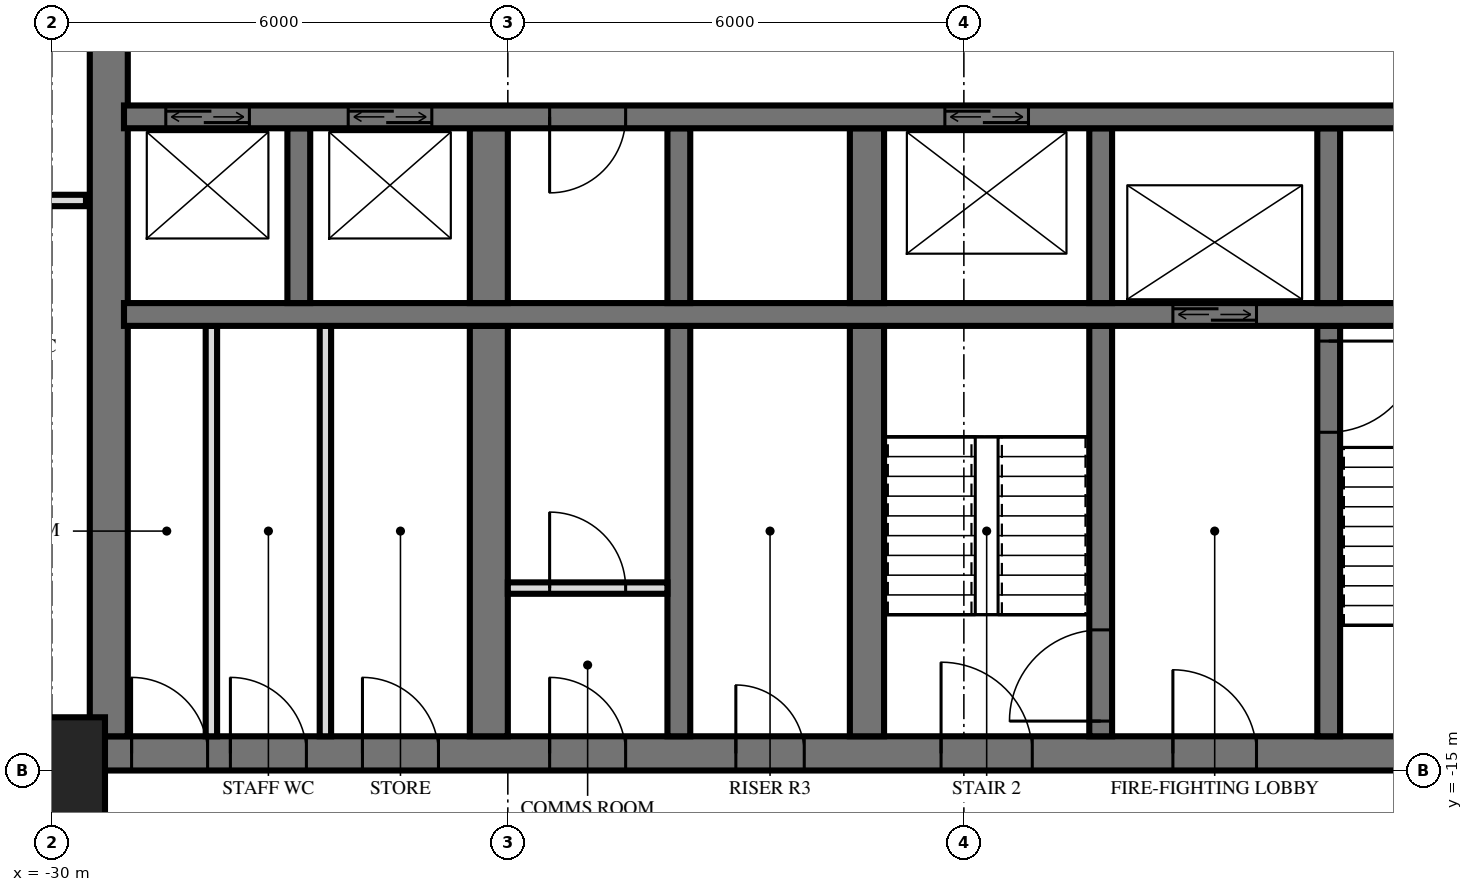
"""IFC4 building model, lengths in metres.
Left out: names, types, materials, properties, quantities, classifications, styles, units other than length and angle.
Written with IfcOpenShell. Run it as: python <this file> out.ifc"""

import sys

from ifc_helpers import new_model, si_unit, direction, frame, frame_2d, origin, origin_2d, place, context, subcontext, project, spatial, rectangle, extrude, element, fill, save


model = new_model("IFC4")
c1 = context("Model", 3, precision=1e-05, world=origin(), true_north=direction((0.0, 1.0)))
c2 = subcontext(c1, "Body", "Model", "MODEL_VIEW")
j1 = project(units=[si_unit("LENGTHUNIT", "METRE"), si_unit("PLANEANGLEUNIT", "RADIAN")], contexts=[c1])
p1 = place(None, origin())
s1 = spatial("IfcSite", under=j1, at=p1, CompositionType="ELEMENT")
p2 = place(p1, origin())
s2 = spatial("IfcBuilding", under=s1, at=p2, CompositionType="ELEMENT")
p3 = place(p2, frame((0.0, 0.0, 92.4)))
s3 = spatial("IfcBuildingStorey", under=s2, at=p3, CompositionType="ELEMENT", Elevation=92.4)
p4 = place(p3, frame((-30.0, -15.0, 0.0), z_axis=(0.0, 0.0, 1.0), x_axis=(1.0, 0.0, 0.0)))
e1 = element("IfcColumn", 1, at=p4, inside=s3, PredefinedType="COLUMN", context=c2, shape_type="SweptSolid", body=[
    extrude(rectangle(XDim=1.4, YDim=1.4, at=origin_2d()), origin(), (0.0, 0.0, 1.0), 3.6),
])
p5 = place(p3, frame((-29.5, -14.775, 0.0), z_axis=(0.0, 0.0, 1.0), x_axis=(1.0, 0.0, 0.0)))
e2 = element("IfcWall", 2, at=p5, inside=s3, PredefinedType="SHEAR", context=c2, shape_type="SweptSolid", body=[
    extrude(rectangle(XDim=19.5, YDim=0.45, at=frame_2d((9.75, 0.0))), origin(), (0.0, 0.0, 1.0), 3.6),
])
p6 = place(p5, frame((11.2, 0.0, 0.0)))
e3 = element("IfcOpeningElement", 3, at=p6, cuts=e2, PredefinedType="OPENING", context=c2, shape_type="SweptSolid", body=[
    extrude(rectangle(XDim=1.2, YDim=2.1, at=frame_2d((0.6, 1.05))), frame((0.0, 0.235, 0.0), z_axis=(0.0, -1.0, 0.0), x_axis=(1.0, 0.0, 0.0)), (0.0, 0.0, 1.0), 0.47),
])
p7 = place(p5, frame((14.25, 0.0, 0.0)))
e4 = element("IfcOpeningElement", 4, at=p7, cuts=e2, PredefinedType="OPENING", context=c2, shape_type="SweptSolid", body=[
    extrude(rectangle(XDim=1.1, YDim=2.1, at=frame_2d((0.55, 1.05))), frame((0.0, 0.235, 0.0), z_axis=(0.0, -1.0, 0.0), x_axis=(1.0, 0.0, 0.0)), (0.0, 0.0, 1.0), 0.47),
])
p8 = place(p5, frame((8.5, 0.0, 0.0)))
e5 = element("IfcOpeningElement", 5, at=p8, cuts=e2, PredefinedType="OPENING", context=c2, shape_type="SweptSolid", body=[
    extrude(rectangle(XDim=0.9, YDim=2.1, at=frame_2d((0.45, 1.05))), frame((0.0, 0.235, 0.0), z_axis=(0.0, -1.0, 0.0), x_axis=(1.0, 0.0, 0.0)), (0.0, 0.0, 1.0), 0.47),
])
p9 = place(p5, frame((6.05, 0.0, 0.0)))
e6 = element("IfcOpeningElement", 6, at=p9, cuts=e2, PredefinedType="OPENING", context=c2, shape_type="SweptSolid", body=[
    extrude(rectangle(XDim=1.0, YDim=2.1, at=frame_2d((0.5, 1.05))), frame((0.0, 0.235, 0.0), z_axis=(0.0, -1.0, 0.0), x_axis=(1.0, 0.0, 0.0)), (0.0, 0.0, 1.0), 0.47),
])
p10 = place(p5, frame((3.587, 0.0, 0.0)))
e7 = element("IfcOpeningElement", 7, at=p10, cuts=e2, PredefinedType="OPENING", context=c2, shape_type="SweptSolid", body=[
    extrude(rectangle(XDim=1.0, YDim=2.1, at=frame_2d((0.5, 1.05))), frame((0.0, 0.235, 0.0), z_axis=(0.0, -1.0, 0.0), x_axis=(1.0, 0.0, 0.0)), (0.0, 0.0, 1.0), 0.47),
])
p11 = place(p5, frame((1.85, 0.0, 0.0)))
e8 = element("IfcOpeningElement", 8, at=p11, cuts=e2, PredefinedType="OPENING", context=c2, shape_type="SweptSolid", body=[
    extrude(rectangle(XDim=1.0, YDim=2.1, at=frame_2d((0.5, 1.05))), frame((0.0, 0.235, 0.0), z_axis=(0.0, -1.0, 0.0), x_axis=(1.0, 0.0, 0.0)), (0.0, 0.0, 1.0), 0.47),
])
p12 = place(p5, frame((0.55, 0.0, 0.0)))
e9 = element("IfcOpeningElement", 9, at=p12, cuts=e2, PredefinedType="OPENING", context=c2, shape_type="SweptSolid", body=[
    extrude(rectangle(XDim=1.0, YDim=2.1, at=frame_2d((0.5, 1.05))), frame((0.0, 0.235, 0.0), z_axis=(0.0, -1.0, 0.0), x_axis=(1.0, 0.0, 0.0)), (0.0, 0.0, 1.0), 0.47),
])
p13 = place(p3, frame((-29.25, -14.55, 0.0), z_axis=(0.0, 0.0, 1.0), x_axis=(0.0, 1.0, 0.0)))
e10 = element("IfcWall", 10, at=p13, inside=s3, PredefinedType="SHEAR", context=c2, shape_type="SweptSolid", body=[
    extrude(rectangle(XDim=14.1, YDim=0.5, at=frame_2d((7.05, 0.0))), origin(), (0.0, 0.0, 1.0), 3.6),
])
p14 = place(p3, frame((-29.05, -6.4, 0.0), z_axis=(0.0, 0.0, 1.0), x_axis=(1.0, 0.0, 0.0)))
e11 = element("IfcWall", 11, at=p14, inside=s3, PredefinedType="SHEAR", context=c2, shape_type="SweptSolid", body=[
    extrude(rectangle(XDim=18.7, YDim=0.3, at=frame_2d((9.35, 0.0))), origin(), (0.0, 0.0, 1.0), 3.6),
])
p15 = place(p14, frame((2.95, 0.0, 0.0)))
e12 = element("IfcOpeningElement", 12, at=p15, cuts=e11, PredefinedType="OPENING", context=c2, shape_type="SweptSolid", body=[
    extrude(rectangle(XDim=1.1, YDim=2.1, at=frame_2d((0.55, 1.05))), frame((0.0, 0.16, 0.0), z_axis=(0.0, -1.0, 0.0), x_axis=(1.0, 0.0, 0.0)), (0.0, 0.0, 1.0), 0.32),
])
p16 = place(p14, frame((0.55, 0.0, 0.0)))
e13 = element("IfcOpeningElement", 13, at=p16, cuts=e11, PredefinedType="OPENING", context=c2, shape_type="SweptSolid", body=[
    extrude(rectangle(XDim=1.1, YDim=2.1, at=frame_2d((0.55, 1.05))), frame((0.0, 0.16, 0.0), z_axis=(0.0, -1.0, 0.0), x_axis=(1.0, 0.0, 0.0)), (0.0, 0.0, 1.0), 0.32),
])
p17 = place(p14, frame((10.8, 0.0, 0.0)))
e14 = element("IfcOpeningElement", 14, at=p17, cuts=e11, PredefinedType="OPENING", context=c2, shape_type="SweptSolid", body=[
    extrude(rectangle(XDim=1.1, YDim=2.1, at=frame_2d((0.55, 1.05))), frame((0.0, 0.16, 0.0), z_axis=(0.0, -1.0, 0.0), x_axis=(1.0, 0.0, 0.0)), (0.0, 0.0, 1.0), 0.32),
])
p18 = place(p14, frame((5.6, 0.0, 0.0)))
e15 = element("IfcOpeningElement", 15, at=p18, cuts=e11, PredefinedType="OPENING", context=c2, shape_type="SweptSolid", body=[
    extrude(rectangle(XDim=1.0, YDim=2.1, at=frame_2d((0.5, 1.05))), frame((0.0, 0.16, 0.0), z_axis=(0.0, -1.0, 0.0), x_axis=(1.0, 0.0, 0.0)), (0.0, 0.0, 1.0), 0.32),
])
p19 = place(p3, frame((-29.05, -9.0, 0.0), z_axis=(0.0, 0.0, 1.0), x_axis=(1.0, 0.0, 0.0)))
e16 = element("IfcWall", 16, at=p19, inside=s3, PredefinedType="SHEAR", context=c2, shape_type="SweptSolid", body=[
    extrude(rectangle(XDim=18.7, YDim=0.3, at=frame_2d((9.35, 0.0))), origin(), (0.0, 0.0, 1.0), 3.6),
])
p20 = place(p19, frame((13.8, 0.0, 0.0)))
e17 = element("IfcOpeningElement", 17, at=p20, cuts=e16, PredefinedType="OPENING", context=c2, shape_type="SweptSolid", body=[
    extrude(rectangle(XDim=1.1, YDim=2.1, at=frame_2d((0.55, 1.05))), frame((0.0, 0.16, 0.0), z_axis=(0.0, -1.0, 0.0), x_axis=(1.0, 0.0, 0.0)), (0.0, 0.0, 1.0), 0.32),
])
p21 = place(p3, frame((-13.2, -8.85, 0.0), z_axis=(0.0, 0.0, 1.0), x_axis=(0.0, 1.0, 0.0)))
e18 = element("IfcWall", 18, at=p21, inside=s3, PredefinedType="SHEAR", context=c2, shape_type="SweptSolid", body=[
    extrude(rectangle(XDim=2.3, YDim=0.3, at=frame_2d((1.15, 0.0))), origin(), (0.0, 0.0, 1.0), 3.6),
])
p22 = place(p3, frame((-13.2, -14.55, 0.0), z_axis=(0.0, 0.0, 1.0), x_axis=(0.0, 1.0, 0.0)))
e19 = element("IfcWall", 19, at=p22, inside=s3, PredefinedType="SHEAR", context=c2, shape_type="SweptSolid", body=[
    extrude(rectangle(XDim=5.4, YDim=0.3, at=frame_2d((2.7, 0.0))), origin(), (0.0, 0.0, 1.0), 3.6),
])
p23 = place(p22, frame((4.0, 0.0, 0.0)))
e20 = element("IfcOpeningElement", 20, at=p23, cuts=e19, PredefinedType="OPENING", context=c2, shape_type="SweptSolid", body=[
    extrude(rectangle(XDim=1.2, YDim=2.1, at=frame_2d((0.6, 1.05))), frame((0.0, 0.16, 0.0), z_axis=(0.0, -1.0, 0.0), x_axis=(1.0, 0.0, 0.0)), (0.0, 0.0, 1.0), 0.32),
])
p24 = place(p3, frame((-16.2, -8.85, 0.0), z_axis=(0.0, 0.0, 1.0), x_axis=(0.0, 1.0, 0.0)))
e21 = element("IfcWall", 21, at=p24, inside=s3, PredefinedType="SHEAR", context=c2, shape_type="SweptSolid", body=[
    extrude(rectangle(XDim=2.3, YDim=0.3, at=frame_2d((1.15, 0.0))), origin(), (0.0, 0.0, 1.0), 3.6),
])
p25 = place(p3, frame((-16.2, -14.55, 0.0), z_axis=(0.0, 0.0, 1.0), x_axis=(0.0, 1.0, 0.0)))
e22 = element("IfcWall", 22, at=p25, inside=s3, PredefinedType="SHEAR", context=c2, shape_type="SweptSolid", body=[
    extrude(rectangle(XDim=5.4, YDim=0.3, at=frame_2d((2.7, 0.0))), origin(), (0.0, 0.0, 1.0), 3.6),
])
p26 = place(p25, frame((0.2, 0.0, 0.0)))
e23 = element("IfcOpeningElement", 23, at=p26, cuts=e22, PredefinedType="OPENING", context=c2, shape_type="SweptSolid", body=[
    extrude(rectangle(XDim=1.2, YDim=2.1, at=frame_2d((0.6, 1.05))), frame((0.0, 0.16, 0.0), z_axis=(0.0, -1.0, 0.0), x_axis=(1.0, 0.0, 0.0)), (0.0, 0.0, 1.0), 0.32),
])
p27 = place(p3, frame((-19.275, -8.85, 0.0), z_axis=(0.0, 0.0, 1.0), x_axis=(0.0, 1.0, 0.0)))
e24 = element("IfcWall", 24, at=p27, inside=s3, PredefinedType="SHEAR", context=c2, shape_type="SweptSolid", body=[
    extrude(rectangle(XDim=2.3, YDim=0.45, at=frame_2d((1.15, 0.0))), origin(), (0.0, 0.0, 1.0), 3.6),
])
p28 = place(p3, frame((-19.275, -14.55, 0.0), z_axis=(0.0, 0.0, 1.0), x_axis=(0.0, 1.0, 0.0)))
e25 = element("IfcWall", 25, at=p28, inside=s3, PredefinedType="SHEAR", context=c2, shape_type="SweptSolid", body=[
    extrude(rectangle(XDim=5.4, YDim=0.45, at=frame_2d((2.7, 0.0))), origin(), (0.0, 0.0, 1.0), 3.6),
])
p29 = place(p3, frame((-21.75, -8.85, 0.0), z_axis=(0.0, 0.0, 1.0), x_axis=(0.0, 1.0, 0.0)))
e26 = element("IfcWall", 26, at=p29, inside=s3, PredefinedType="SHEAR", context=c2, shape_type="SweptSolid", body=[
    extrude(rectangle(XDim=2.3, YDim=0.3, at=frame_2d((1.15, 0.0))), origin(), (0.0, 0.0, 1.0), 3.6),
])
p30 = place(p3, frame((-21.75, -14.55, 0.0), z_axis=(0.0, 0.0, 1.0), x_axis=(0.0, 1.0, 0.0)))
e27 = element("IfcWall", 27, at=p30, inside=s3, PredefinedType="SHEAR", context=c2, shape_type="SweptSolid", body=[
    extrude(rectangle(XDim=5.4, YDim=0.3, at=frame_2d((2.7, 0.0))), origin(), (0.0, 0.0, 1.0), 3.6),
])
p31 = place(p3, frame((-24.25, -8.85, 0.0), z_axis=(0.0, 0.0, 1.0), x_axis=(0.0, 1.0, 0.0)))
e28 = element("IfcWall", 28, at=p31, inside=s3, PredefinedType="SHEAR", context=c2, shape_type="SweptSolid", body=[
    extrude(rectangle(XDim=2.3, YDim=0.5, at=frame_2d((1.15, 0.0))), origin(), (0.0, 0.0, 1.0), 3.6),
])
p32 = place(p3, frame((-24.25, -14.55, 0.0), z_axis=(0.0, 0.0, 1.0), x_axis=(0.0, 1.0, 0.0)))
e29 = element("IfcWall", 29, at=p32, inside=s3, PredefinedType="SHEAR", context=c2, shape_type="SweptSolid", body=[
    extrude(rectangle(XDim=5.4, YDim=0.5, at=frame_2d((2.7, 0.0))), origin(), (0.0, 0.0, 1.0), 3.6),
])
p33 = place(p3, frame((-26.75, -8.85, 0.0), z_axis=(0.0, 0.0, 1.0), x_axis=(0.0, 1.0, 0.0)))
e30 = element("IfcWall", 30, at=p33, inside=s3, PredefinedType="SHEAR", context=c2, shape_type="SweptSolid", body=[
    extrude(rectangle(XDim=2.3, YDim=0.3, at=frame_2d((1.15, 0.0))), origin(), (0.0, 0.0, 1.0), 3.6),
])
p34 = place(p3, frame((-24.0, -12.6, 0.0), z_axis=(0.0, 0.0, 1.0), x_axis=(1.0, 0.0, 0.0)))
e31 = element("IfcWall", 31, at=p34, inside=s3, PredefinedType="PARTITIONING", context=c2, shape_type="SweptSolid", body=[
    extrude(rectangle(XDim=2.1, YDim=0.15, at=frame_2d((1.05, 0.0))), origin(), (0.0, 0.0, 1.0), 3.3),
])
p35 = place(p34, frame((0.55, 0.0, 0.0)))
e32 = element("IfcOpeningElement", 32, at=p35, cuts=e31, PredefinedType="OPENING", context=c2, shape_type="SweptSolid", body=[
    extrude(rectangle(XDim=1.0, YDim=2.1, at=frame_2d((0.5, 1.05))), frame((0.0, 0.085, 0.0), z_axis=(0.0, -1.0, 0.0), x_axis=(1.0, 0.0, 0.0)), (0.0, 0.0, 1.0), 0.17),
])
for number, where, z_axis, x_axis in (
    (33, (-26.4, -14.55, 0.0), (0.0, 0.0, 1.0), (0.0, 1.0, 0.0)),
    (34, (-27.9, -14.55, 0.0), (0.0, 0.0, 1.0), (0.0, 1.0, 0.0)),
):
    element("IfcWall", number, at=place(p3, frame(where, z_axis=z_axis, x_axis=x_axis)), inside=s3, PredefinedType="PARTITIONING", context=c2, shape_type="SweptSolid", body=[
        extrude(rectangle(XDim=5.4, YDim=0.15, at=frame_2d((2.7, 0.0))), origin(), (0.0, 0.0, 1.0), 3.3),
    ])
p36 = place(p3, frame((-33.12, -15.0, 0.0), z_axis=(0.0, 0.0, 1.0), x_axis=(1.0, 0.0, 0.0)))
e35 = element("IfcWall", 35, at=p36, inside=s3, PredefinedType="PARTITIONING", context=c2, shape_type="SweptSolid", body=[
    extrude(rectangle(XDim=3.57, YDim=0.15, at=frame_2d((1.785, 0.0))), origin(), (0.0, 0.0, 1.0), 3.32),
])
p37 = place(p36, frame((1.58, 0.0, 0.0)))
e36 = element("IfcOpeningElement", 36, at=p37, cuts=e35, PredefinedType="OPENING", context=c2, shape_type="SweptSolid", body=[
    extrude(rectangle(XDim=0.8, YDim=2.1, at=frame_2d((0.4, 1.05))), frame((0.0, 0.085, 0.0), z_axis=(0.0, -1.0, 0.0), x_axis=(1.0, 0.0, 0.0)), (0.0, 0.0, 1.0), 0.17),
])
p38 = place(p3, frame((-33.12, -7.5, 0.0), z_axis=(0.0, 0.0, 1.0), x_axis=(1.0, 0.0, 0.0)))
e37 = element("IfcWall", 37, at=p38, inside=s3, PredefinedType="PLUMBINGWALL", context=c2, shape_type="SweptSolid", body=[
    extrude(rectangle(XDim=3.57, YDim=0.15, at=frame_2d((1.785, 0.0))), origin(), (0.0, 0.0, 1.0), 3.32),
])
p39 = place(p38, frame((1.27, 0.0, 0.0)))
e38 = element("IfcOpeningElement", 38, at=p39, cuts=e37, PredefinedType="OPENING", context=c2, shape_type="SweptSolid", body=[
    extrude(rectangle(XDim=0.9, YDim=2.1, at=frame_2d((0.45, 1.05))), frame((0.0, 0.085, 0.0), z_axis=(0.0, -1.0, 0.0), x_axis=(1.0, 0.0, 0.0)), (0.0, 0.0, 1.0), 0.17),
])
p40 = place(p15, origin())
e39 = element("IfcDoor", 39, at=p40, inside=s3, OperationType="DOUBLE_DOOR_SLIDING", PredefinedType="USERDEFINED", context=c2, shape_type="SweptSolid", body=[
    extrude(rectangle(XDim=1.1, YDim=2.1, at=frame_2d((0.55, 1.05))), frame((0.0, 0.025, 0.0), z_axis=(0.0, -1.0, 0.0), x_axis=(1.0, 0.0, 0.0)), (0.0, 0.0, 1.0), 0.05),
])
fill(e12, e39)
p41 = place(p16, origin())
e40 = element("IfcDoor", 40, at=p41, inside=s3, OperationType="DOUBLE_DOOR_SLIDING", PredefinedType="USERDEFINED", context=c2, shape_type="SweptSolid", body=[
    extrude(rectangle(XDim=1.1, YDim=2.1, at=frame_2d((0.55, 1.05))), frame((0.0, 0.025, 0.0), z_axis=(0.0, -1.0, 0.0), x_axis=(1.0, 0.0, 0.0)), (0.0, 0.0, 1.0), 0.05),
])
fill(e13, e40)
p42 = place(p20, origin())
e41 = element("IfcDoor", 41, at=p42, inside=s3, OperationType="DOUBLE_DOOR_SLIDING", PredefinedType="USERDEFINED", context=c2, shape_type="SweptSolid", body=[
    extrude(rectangle(XDim=1.1, YDim=2.1, at=frame_2d((0.55, 1.05))), frame((0.0, 0.025, 0.0), z_axis=(0.0, -1.0, 0.0), x_axis=(1.0, 0.0, 0.0)), (0.0, 0.0, 1.0), 0.05),
])
fill(e17, e41)
p43 = place(p17, origin())
e42 = element("IfcDoor", 42, at=p43, inside=s3, OperationType="DOUBLE_DOOR_SLIDING", PredefinedType="USERDEFINED", context=c2, shape_type="SweptSolid", body=[
    extrude(rectangle(XDim=1.1, YDim=2.1, at=frame_2d((0.55, 1.05))), frame((0.0, 0.025, 0.0), z_axis=(0.0, -1.0, 0.0), x_axis=(1.0, 0.0, 0.0)), (0.0, 0.0, 1.0), 0.05),
])
fill(e14, e42)
p44 = place(p6, origin())
e43 = element("IfcDoor", 43, at=p44, inside=s3, OperationType="SINGLE_SWING_RIGHT", PredefinedType="DOOR", context=c2, shape_type="SweptSolid", body=[
    extrude(rectangle(XDim=1.2, YDim=2.1, at=frame_2d((0.6, 1.05))), frame((0.0, 0.025, 0.0), z_axis=(0.0, -1.0, 0.0), x_axis=(1.0, 0.0, 0.0)), (0.0, 0.0, 1.0), 0.05),
])
fill(e3, e43)
p45 = place(p7, origin())
e44 = element("IfcDoor", 44, at=p45, inside=s3, OperationType="SINGLE_SWING_RIGHT", PredefinedType="DOOR", context=c2, shape_type="SweptSolid", body=[
    extrude(rectangle(XDim=1.1, YDim=2.1, at=frame_2d((0.55, 1.05))), frame((0.0, 0.025, 0.0), z_axis=(0.0, -1.0, 0.0), x_axis=(1.0, 0.0, 0.0)), (0.0, 0.0, 1.0), 0.05),
])
fill(e4, e44)
p46 = place(p8, origin())
e45 = element("IfcDoor", 45, at=p46, inside=s3, OperationType="SINGLE_SWING_RIGHT", PredefinedType="DOOR", context=c2, shape_type="SweptSolid", body=[
    extrude(rectangle(XDim=0.9, YDim=2.1, at=frame_2d((0.45, 1.05))), frame((0.0, 0.025, 0.0), z_axis=(0.0, -1.0, 0.0), x_axis=(1.0, 0.0, 0.0)), (0.0, 0.0, 1.0), 0.05),
])
fill(e5, e45)
p47 = place(p9, origin())
e46 = element("IfcDoor", 46, at=p47, inside=s3, OperationType="SINGLE_SWING_RIGHT", PredefinedType="DOOR", context=c2, shape_type="SweptSolid", body=[
    extrude(rectangle(XDim=1.0, YDim=2.1, at=frame_2d((0.5, 1.05))), frame((0.0, 0.025, 0.0), z_axis=(0.0, -1.0, 0.0), x_axis=(1.0, 0.0, 0.0)), (0.0, 0.0, 1.0), 0.05),
])
fill(e6, e46)
p48 = place(p10, origin())
e47 = element("IfcDoor", 47, at=p48, inside=s3, OperationType="SINGLE_SWING_RIGHT", PredefinedType="DOOR", context=c2, shape_type="SweptSolid", body=[
    extrude(rectangle(XDim=1.0, YDim=2.1, at=frame_2d((0.5, 1.05))), frame((0.0, 0.025, 0.0), z_axis=(0.0, -1.0, 0.0), x_axis=(1.0, 0.0, 0.0)), (0.0, 0.0, 1.0), 0.05),
])
fill(e7, e47)
p49 = place(p11, origin())
e48 = element("IfcDoor", 48, at=p49, inside=s3, OperationType="SINGLE_SWING_RIGHT", PredefinedType="DOOR", context=c2, shape_type="SweptSolid", body=[
    extrude(rectangle(XDim=1.0, YDim=2.1, at=frame_2d((0.5, 1.05))), frame((0.0, 0.025, 0.0), z_axis=(0.0, -1.0, 0.0), x_axis=(1.0, 0.0, 0.0)), (0.0, 0.0, 1.0), 0.05),
])
fill(e8, e48)
p50 = place(p12, origin())
e49 = element("IfcDoor", 49, at=p50, inside=s3, OperationType="SINGLE_SWING_RIGHT", PredefinedType="DOOR", context=c2, shape_type="SweptSolid", body=[
    extrude(rectangle(XDim=1.0, YDim=2.1, at=frame_2d((0.5, 1.05))), frame((0.0, 0.025, 0.0), z_axis=(0.0, -1.0, 0.0), x_axis=(1.0, 0.0, 0.0)), (0.0, 0.0, 1.0), 0.05),
])
fill(e9, e49)
p51 = place(p18, frame((0.5, 0.0, 0.0), z_axis=(0.0, 0.0, 1.0), x_axis=(-1.0, 0.0, 0.0)))
e50 = element("IfcDoor", 50, at=p51, inside=s3, OperationType="SINGLE_SWING_LEFT", PredefinedType="DOOR", context=c2, shape_type="SweptSolid", body=[
    extrude(rectangle(XDim=1.0, YDim=2.1, at=frame_2d((0.0, 1.05))), frame((0.0, -0.025, 0.0), z_axis=(0.0, 1.0, 0.0), x_axis=(-1.0, 0.0, 0.0)), (0.0, 0.0, 1.0), 0.05),
])
fill(e15, e50)
p52 = place(p23, frame((0.6, 0.0, 0.0), z_axis=(0.0, 0.0, 1.0), x_axis=(-1.0, 0.0, 0.0)))
e51 = element("IfcDoor", 51, at=p52, inside=s3, OperationType="SINGLE_SWING_RIGHT", PredefinedType="DOOR", context=c2, shape_type="SweptSolid", body=[
    extrude(rectangle(XDim=1.2, YDim=2.1, at=frame_2d((0.0, 1.05))), frame((0.0, -0.025, 0.0), z_axis=(0.0, 1.0, 0.0), x_axis=(-1.0, 0.0, 0.0)), (0.0, 0.0, 1.0), 0.05),
])
fill(e20, e51)
p53 = place(p26, origin())
e52 = element("IfcDoor", 52, at=p53, inside=s3, OperationType="SINGLE_SWING_RIGHT", PredefinedType="DOOR", context=c2, shape_type="SweptSolid", body=[
    extrude(rectangle(XDim=1.2, YDim=2.1, at=frame_2d((0.6, 1.05))), frame((0.0, 0.025, 0.0), z_axis=(0.0, -1.0, 0.0), x_axis=(1.0, 0.0, 0.0)), (0.0, 0.0, 1.0), 0.05),
])
fill(e23, e52)
p54 = place(p35, origin())
e53 = element("IfcDoor", 53, at=p54, inside=s3, OperationType="SINGLE_SWING_RIGHT", PredefinedType="DOOR", context=c2, shape_type="SweptSolid", body=[
    extrude(rectangle(XDim=1.0, YDim=2.1, at=frame_2d((0.5, 1.05))), frame((0.0, 0.025, 0.0), z_axis=(0.0, -1.0, 0.0), x_axis=(1.0, 0.0, 0.0)), (0.0, 0.0, 1.0), 0.05),
])
fill(e32, e53)
save(model, sys.argv[1])
